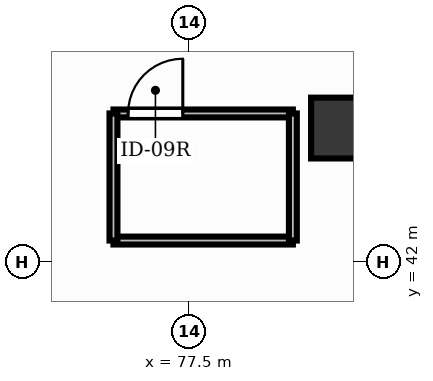
"""IFC4 building model, lengths in metres.
Left out: names, types, materials, properties, quantities, classifications, styles, units other than length and angle.
Written with IfcOpenShell. Run it as: python <this file> out.ifc"""

import sys

from ifc_helpers import new_model, si_unit, direction, frame, frame_2d, origin, origin_2d, place, context, subcontext, project, spatial, rectangle, extrude, element, fill, save


model = new_model("IFC4")
c1 = context("Model", 3, precision=1e-05, world=origin(), true_north=direction((0.0, 1.0)))
c2 = subcontext(c1, "Body", "Model", "MODEL_VIEW")
j1 = project(units=[si_unit("LENGTHUNIT", "METRE"), si_unit("PLANEANGLEUNIT", "RADIAN")], contexts=[c1])
p1 = place(None, origin())
s1 = spatial("IfcSite", under=j1, at=p1, CompositionType="ELEMENT")
p2 = place(p1, origin())
s2 = spatial("IfcBuilding", under=s1, at=p2, CompositionType="ELEMENT")
p3 = place(p2, frame((0.0, 0.0, 5.4)))
s3 = spatial("IfcBuildingStorey", under=s2, at=p3, CompositionType="ELEMENT", Elevation=5.4)
p4 = place(p3, frame((80.0, 44.2, 0.0), z_axis=(0.0, 0.0, 1.0), x_axis=(1.0, 0.0, 0.0)))
e1 = element("IfcColumn", 1, at=p4, inside=s3, PredefinedType="COLUMN", context=c2, shape_type="SweptSolid", body=[
    extrude(rectangle(XDim=1.0, YDim=1.0, at=origin_2d()), origin(), (0.0, 0.0, 1.0), 4.5),
])
p5 = place(p3, frame((76.25, 44.44, 0.0), z_axis=(0.0, 0.0, 1.0), x_axis=(1.0, 0.0, 0.0)))
e2 = element("IfcWall", 2, at=p5, inside=s3, PredefinedType="PARTITIONING", context=c2, shape_type="SweptSolid", body=[
    extrude(rectangle(XDim=2.95, YDim=0.13, at=frame_2d((1.475, 0.0))), origin(), (0.0, 0.0, 1.0), 3.51),
])
p6 = place(p5, frame((0.24, 0.0, 0.0)))
e3 = element("IfcOpeningElement", 3, at=p6, cuts=e2, PredefinedType="OPENING", context=c2, shape_type="SweptSolid", body=[
    extrude(rectangle(XDim=0.9, YDim=2.15, at=frame_2d((0.45, 1.075))), frame((0.0, 0.08, 0.0), z_axis=(0.0, -1.0, 0.0), x_axis=(1.0, 0.0, 0.0)), (0.0, 0.0, 1.0), 0.16),
])
p7 = place(p3, frame((79.2, 42.35, 0.0), z_axis=(0.0, 0.0, 1.0), x_axis=(-1.0, 0.0, 0.0)))
e4 = element("IfcWall", 4, at=p7, inside=s3, PredefinedType="PARTITIONING", context=c2, shape_type="SweptSolid", body=[
    extrude(rectangle(XDim=2.95, YDim=0.13, at=frame_2d((1.475, 0.0))), origin(), (0.0, 0.0, 1.0), 3.51),
])
for number, where, z_axis, x_axis in (
    (5, (76.25, 42.35, 0.0), (0.0, 0.0, 1.0), (0.0, 1.0, 0.0)),
    (6, (79.2, 44.44, 0.0), (0.0, 0.0, 1.0), (0.0, -1.0, 0.0)),
):
    element("IfcWall", number, at=place(p3, frame(where, z_axis=z_axis, x_axis=x_axis)), inside=s3, PredefinedType="PARTITIONING", context=c2, shape_type="SweptSolid", body=[
        extrude(rectangle(XDim=2.09, YDim=0.13, at=frame_2d((1.045, 0.0))), origin(), (0.0, 0.0, 1.0), 3.51),
    ])
p8 = place(p6, origin())
e7 = element("IfcDoor", 7, at=p8, inside=s3, OperationType="SINGLE_SWING_RIGHT", PredefinedType="DOOR", context=c2, shape_type="SweptSolid", body=[
    extrude(rectangle(XDim=0.9, YDim=2.15, at=frame_2d((0.45, 1.075))), frame((0.0, 0.025, 0.0), z_axis=(0.0, -1.0, 0.0), x_axis=(1.0, 0.0, 0.0)), (0.0, 0.0, 1.0), 0.05),
])
fill(e3, e7)
save(model, sys.argv[1])
